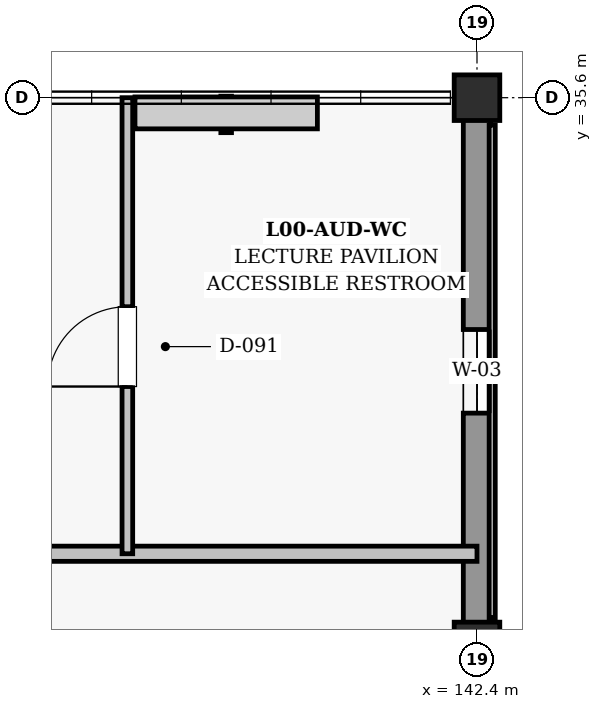
"""IFC4 building model, lengths in metres.
Left out: names, types, materials, properties, quantities, classifications, styles, units other than length and angle.
Written with IfcOpenShell. Run it as: python <this file> out.ifc"""

import sys

from ifc_helpers import new_model, si_unit, direction, frame, frame_2d, origin, origin_2d, place, context, subcontext, project, spatial, rectangle, extrude, element, fill, save


model = new_model("IFC4")
c1 = context("Model", 3, precision=1e-05, world=origin(), true_north=direction((0.0, 1.0)))
c2 = subcontext(c1, "Body", "Model", "MODEL_VIEW")
j1 = project(units=[si_unit("LENGTHUNIT", "METRE"), si_unit("PLANEANGLEUNIT", "RADIAN")], contexts=[c1])
p1 = place(None, origin())
s1 = spatial("IfcSite", under=j1, at=p1, CompositionType="ELEMENT")
p2 = place(p1, origin())
s2 = spatial("IfcBuilding", under=s1, at=p2, CompositionType="ELEMENT")
p3 = place(p2, origin())
s3 = spatial("IfcBuildingStorey", under=s2, at=p3, CompositionType="ELEMENT", Elevation=0.0)
for number, where, z_axis, x_axis in (
    (1, (142.4, 28.4, 0.0), (0.0, 0.0, 1.0), (1.0, 0.0, 0.0)),
    (2, (142.4, 35.6, 0.0), (0.0, 0.0, 1.0), (1.0, 0.0, 0.0)),
):
    element("IfcColumn", number, at=place(p3, frame(where, z_axis=z_axis, x_axis=x_axis)), inside=s3, PredefinedType="COLUMN", context=c2, shape_type="SweptSolid", body=[
        extrude(rectangle(XDim=0.6, YDim=0.6, at=origin_2d()), origin(), (0.0, 0.0, 1.0), 5.4),
    ])
p4 = place(p3, frame((142.4, 28.66, 0.0), z_axis=(0.0, 0.0, 1.0), x_axis=(0.0, 1.0, 0.0)))
e3 = element("IfcWall", 3, at=p4, inside=s3, PredefinedType="SOLIDWALL", context=c2, shape_type="SweptSolid", body=[
    extrude(rectangle(XDim=6.68, YDim=0.36, at=frame_2d((3.34, 0.0))), origin(), (0.0, 0.0, 1.0), 4.335),
])
p5 = place(p4, frame((2.79, 0.0, 0.95)))
e4 = element("IfcOpeningElement", 4, at=p5, cuts=e3, PredefinedType="OPENING", context=c2, shape_type="SweptSolid", body=[
    extrude(rectangle(XDim=1.1, YDim=2.3, at=frame_2d((0.55, 1.15))), frame((0.0, 0.19, 0.0), z_axis=(0.0, -1.0, 0.0), x_axis=(1.0, 0.0, 0.0)), (0.0, 0.0, 1.0), 0.38),
])
p6 = place(p3, frame((114.8, 29.6, 0.0), z_axis=(0.0, 0.0, 1.0), x_axis=(1.0, 0.0, 0.0)))
e5 = element("IfcWall", 5, at=p6, inside=s3, PredefinedType="SOLIDWALL", context=c2, shape_type="SweptSolid", body=[
    extrude(rectangle(XDim=27.6, YDim=0.2, at=frame_2d((13.8, 0.0))), origin(), (0.0, 0.0, 1.0), 4.34),
])
p7 = place(p6, frame((4.6, 0.0, 0.0)))
e6 = element("IfcOpeningElement", 6, at=p7, cuts=e5, PredefinedType="OPENING", context=c2, shape_type="SweptSolid", body=[
    extrude(rectangle(XDim=1.8, YDim=2.25, at=frame_2d((0.9, 1.125))), frame((0.0, 0.11, 0.0), z_axis=(0.0, -1.0, 0.0), x_axis=(1.0, 0.0, 0.0)), (0.0, 0.0, 1.0), 0.22),
])
p8 = place(p6, frame((19.0, 0.0, 0.0)))
e7 = element("IfcOpeningElement", 7, at=p8, cuts=e5, PredefinedType="OPENING", context=c2, shape_type="SweptSolid", body=[
    extrude(rectangle(XDim=1.8, YDim=2.25, at=frame_2d((0.9, 1.125))), frame((0.0, 0.11, 0.0), z_axis=(0.0, -1.0, 0.0), x_axis=(1.0, 0.0, 0.0)), (0.0, 0.0, 1.0), 0.22),
])
p9 = place(p3, frame((137.8, 29.6, 0.0), z_axis=(0.0, 0.0, 1.0), x_axis=(0.0, 1.0, 0.0)))
e8 = element("IfcWall", 8, at=p9, inside=s3, PredefinedType="PARTITIONING", context=c2, shape_type="SweptSolid", body=[
    extrude(rectangle(XDim=6.0, YDim=0.14, at=frame_2d((3.0, 0.0))), origin(), (0.0, 0.0, 1.0), 4.59),
])
p10 = place(p9, frame((2.2, 0.0, 0.0)))
e9 = element("IfcOpeningElement", 9, at=p10, cuts=e8, PredefinedType="OPENING", context=c2, shape_type="SweptSolid", body=[
    extrude(rectangle(XDim=1.05, YDim=2.15, at=frame_2d((0.525, 1.075))), frame((0.0, 0.08, 0.0), z_axis=(0.0, -1.0, 0.0), x_axis=(1.0, 0.0, 0.0)), (0.0, 0.0, 1.0), 0.16),
])
p11 = place(p5, origin())
e10 = element("IfcWindow", 10, at=p11, inside=s3, PartitioningType="SINGLE_PANEL", PredefinedType="WINDOW", context=c2, shape_type="SweptSolid", body=[
    extrude(rectangle(XDim=1.1, YDim=2.3, at=frame_2d((0.55, 1.15))), frame((0.0, 0.03, 0.0), z_axis=(0.0, -1.0, 0.0), x_axis=(1.0, 0.0, 0.0)), (0.0, 0.0, 1.0), 0.06),
])
fill(e4, e10)
p12 = place(p10, origin())
e11 = element("IfcDoor", 11, at=p12, inside=s3, OperationType="SINGLE_SWING_LEFT", PredefinedType="DOOR", context=c2, shape_type="SweptSolid", body=[
    extrude(rectangle(XDim=1.05, YDim=2.15, at=frame_2d((0.525, 1.075))), frame((0.0, 0.025, 0.0), z_axis=(0.0, -1.0, 0.0), x_axis=(1.0, 0.0, 0.0)), (0.0, 0.0, 1.0), 0.05),
])
fill(e9, e11)
save(model, sys.argv[1])
